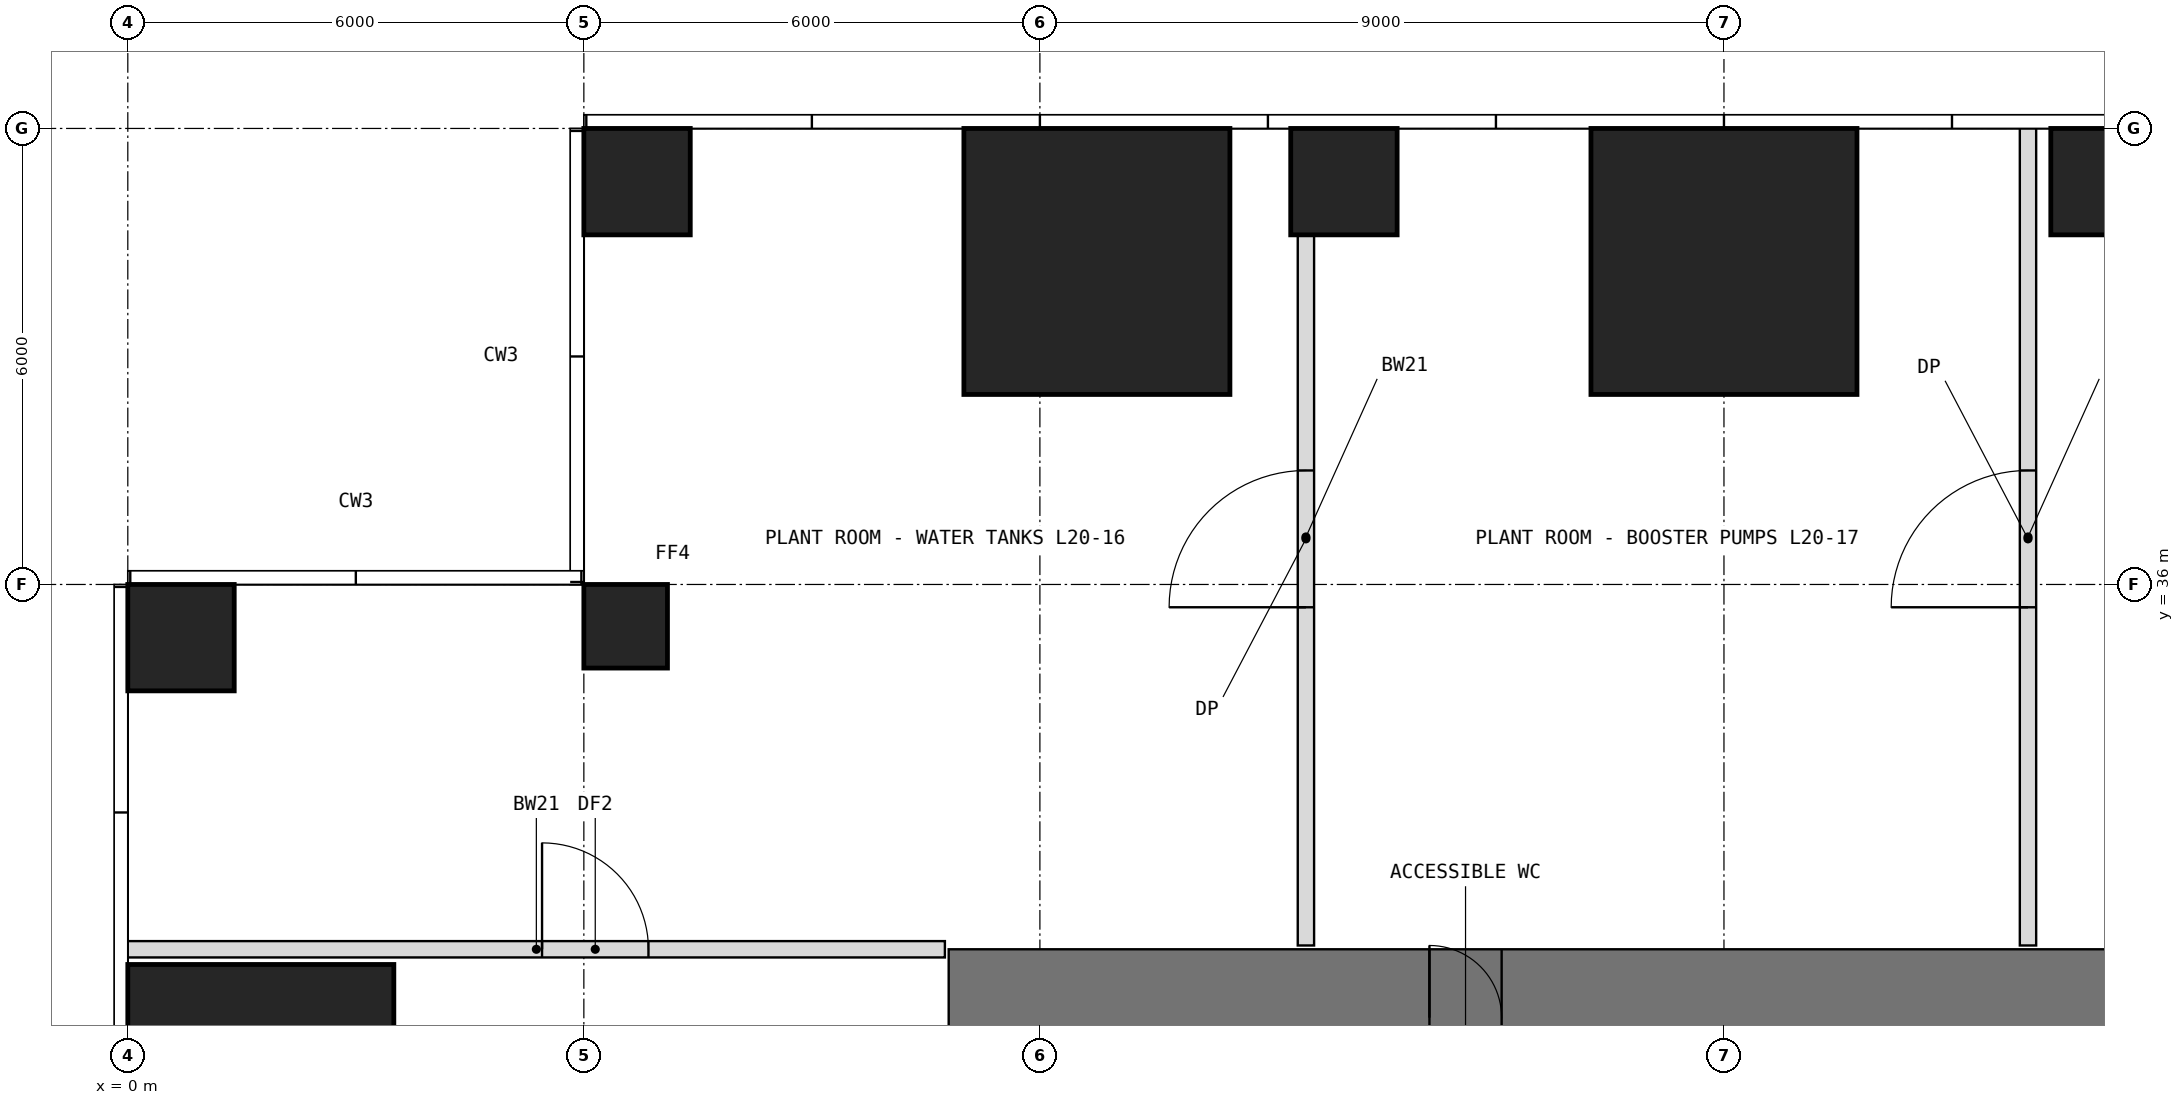
"""IFC4 building model, lengths in metres.
Left out: names, types, materials, properties, quantities, classifications, styles, units other than length and angle.
Written with IfcOpenShell. Run it as: python <this file> out.ifc"""

import sys

from ifc_helpers import new_model, si_unit, direction, frame, frame_2d, origin, origin_2d, place, context, subcontext, project, spatial, rectangle, extrude, element, fill, save


model = new_model("IFC4")
c1 = context("Model", 3, precision=1e-05, world=origin(), true_north=direction((0.0, 1.0)))
c2 = subcontext(c1, "Body", "Model", "MODEL_VIEW")
j1 = project(units=[si_unit("LENGTHUNIT", "METRE"), si_unit("PLANEANGLEUNIT", "RADIAN")], contexts=[c1])
p1 = place(None, origin())
s1 = spatial("IfcSite", under=j1, at=p1, CompositionType="ELEMENT")
p2 = place(p1, origin())
s2 = spatial("IfcBuilding", under=s1, at=p2, CompositionType="ELEMENT")
p3 = place(p2, frame((0.0, 0.0, 86.5)))
s3 = spatial("IfcBuildingStorey", under=s2, at=p3, CompositionType="ELEMENT", Elevation=86.5)
p4 = place(p3, frame((1.75, 29.25, 0.0), z_axis=(0.0, 0.0, 1.0), x_axis=(1.0, 0.0, 0.0)))
e1 = element("IfcColumn", 1, at=p4, inside=s3, PredefinedType="COLUMN", context=c2, shape_type="SweptSolid", body=[
    extrude(rectangle(XDim=3.5, YDim=3.5, at=origin_2d()), origin(), (0.0, 0.0, 1.0), 5.0),
])
p5 = place(p3, frame((0.7, 35.3, 0.0), z_axis=(0.0, 0.0, 1.0), x_axis=(1.0, 0.0, 0.0)))
e2 = element("IfcColumn", 2, at=p5, inside=s3, PredefinedType="COLUMN", context=c2, shape_type="SweptSolid", body=[
    extrude(rectangle(XDim=1.4, YDim=1.4, at=origin_2d()), origin(), (0.0, 0.0, 1.0), 5.0),
])
p6 = place(p3, frame((6.55, 35.45, 0.0), z_axis=(0.0, 0.0, 1.0), x_axis=(1.0, 0.0, 0.0)))
e3 = element("IfcColumn", 3, at=p6, inside=s3, PredefinedType="COLUMN", context=c2, shape_type="SweptSolid", body=[
    extrude(rectangle(XDim=1.1, YDim=1.1, at=origin_2d()), origin(), (0.0, 0.0, 1.0), 5.0),
])
p7 = place(p3, frame((6.7, 41.3, 0.0), z_axis=(0.0, 0.0, 1.0), x_axis=(1.0, 0.0, 0.0)))
e4 = element("IfcColumn", 4, at=p7, inside=s3, PredefinedType="COLUMN", context=c2, shape_type="SweptSolid", body=[
    extrude(rectangle(XDim=1.4, YDim=1.4, at=origin_2d()), origin(), (0.0, 0.0, 1.0), 5.0),
])
p8 = place(p3, frame((12.75, 40.25, 0.0), z_axis=(0.0, 0.0, 1.0), x_axis=(1.0, 0.0, 0.0)))
e5 = element("IfcColumn", 5, at=p8, inside=s3, PredefinedType="COLUMN", context=c2, shape_type="SweptSolid", body=[
    extrude(rectangle(XDim=3.5, YDim=3.5, at=origin_2d()), origin(), (0.0, 0.0, 1.0), 5.0),
])
p9 = place(p3, frame((16.0, 41.3, 0.0), z_axis=(0.0, 0.0, 1.0), x_axis=(1.0, 0.0, 0.0)))
e6 = element("IfcColumn", 6, at=p9, inside=s3, PredefinedType="COLUMN", context=c2, shape_type="SweptSolid", body=[
    extrude(rectangle(XDim=1.4, YDim=1.4, at=origin_2d()), origin(), (0.0, 0.0, 1.0), 5.0),
])
p10 = place(p3, frame((21.0, 40.25, 0.0), z_axis=(0.0, 0.0, 1.0), x_axis=(1.0, 0.0, 0.0)))
e7 = element("IfcColumn", 7, at=p10, inside=s3, PredefinedType="COLUMN", context=c2, shape_type="SweptSolid", body=[
    extrude(rectangle(XDim=3.5, YDim=3.5, at=origin_2d()), origin(), (0.0, 0.0, 1.0), 5.0),
])
p11 = place(p3, frame((26.0, 41.3, 0.0), z_axis=(0.0, 0.0, 1.0), x_axis=(1.0, 0.0, 0.0)))
e8 = element("IfcColumn", 8, at=p11, inside=s3, PredefinedType="COLUMN", context=c2, shape_type="SweptSolid", body=[
    extrude(rectangle(XDim=1.4, YDim=1.4, at=origin_2d()), origin(), (0.0, 0.0, 1.0), 5.0),
])
p12 = place(p3, frame((10.8, 30.3, -0.25), z_axis=(0.0, 0.0, 1.0), x_axis=(1.0, 0.0, 0.0)))
e9 = element("IfcWall", 9, at=p12, inside=s3, PredefinedType="SHEAR", context=c2, shape_type="SweptSolid", body=[
    extrude(rectangle(XDim=20.4, YDim=1.8, at=frame_2d((10.2, 0.0))), origin(), (0.0, 0.0, 1.0), 5.2),
])
p13 = place(p12, frame((6.325, 0.0, 0.25)))
e10 = element("IfcOpeningElement", 10, at=p13, cuts=e9, PredefinedType="OPENING", context=c2, shape_type="SweptSolid", body=[
    extrude(rectangle(XDim=0.95, YDim=2.4, at=frame_2d((0.475, 1.2))), frame((0.0, 0.91, 0.0), z_axis=(0.0, -1.0, 0.0), x_axis=(1.0, 0.0, 0.0)), (0.0, 0.0, 1.0), 1.82),
])
p14 = place(p3, frame((0.0, 31.2, 0.0), z_axis=(0.0, 0.0, 1.0), x_axis=(1.0, 0.0, 0.0)))
e11 = element("IfcWall", 11, at=p14, inside=s3, PredefinedType="PARTITIONING", context=c2, shape_type="SweptSolid", body=[
    extrude(rectangle(XDim=10.75, YDim=0.215, at=frame_2d((5.375, 0.0))), origin(), (0.0, 0.0, 1.0), 4.75),
])
p15 = place(p14, frame((5.45, 0.0, 0.0)))
e12 = element("IfcOpeningElement", 12, at=p15, cuts=e11, PredefinedType="OPENING", context=c2, shape_type="SweptSolid", body=[
    extrude(rectangle(XDim=1.4, YDim=2.2, at=frame_2d((0.7, 1.1))), frame((0.0, 0.118, 0.0), z_axis=(0.0, -1.0, 0.0), x_axis=(1.0, 0.0, 0.0)), (0.0, 0.0, 1.0), 0.235),
])
p16 = place(p3, frame((15.5, 31.25, 0.0), z_axis=(0.0, 0.0, 1.0), x_axis=(0.0, 1.0, 0.0)))
e13 = element("IfcWall", 13, at=p16, inside=s3, PredefinedType="PARTITIONING", context=c2, shape_type="SweptSolid", body=[
    extrude(rectangle(XDim=10.75, YDim=0.215, at=frame_2d((5.375, 0.0))), origin(), (0.0, 0.0, 1.0), 4.75),
])
p17 = place(p16, frame((4.45, 0.0, 0.0)))
e14 = element("IfcOpeningElement", 14, at=p17, cuts=e13, PredefinedType="OPENING", context=c2, shape_type="SweptSolid", body=[
    extrude(rectangle(XDim=1.8, YDim=2.4, at=frame_2d((0.9, 1.2))), frame((0.0, 0.118, 0.0), z_axis=(0.0, -1.0, 0.0), x_axis=(1.0, 0.0, 0.0)), (0.0, 0.0, 1.0), 0.235),
])
p18 = place(p3, frame((25.0, 31.25, 0.0), z_axis=(0.0, 0.0, 1.0), x_axis=(0.0, 1.0, 0.0)))
e15 = element("IfcWall", 15, at=p18, inside=s3, PredefinedType="PARTITIONING", context=c2, shape_type="SweptSolid", body=[
    extrude(rectangle(XDim=10.75, YDim=0.215, at=frame_2d((5.375, 0.0))), origin(), (0.0, 0.0, 1.0), 4.75),
])
p19 = place(p18, frame((4.45, 0.0, 0.0)))
e16 = element("IfcOpeningElement", 16, at=p19, cuts=e15, PredefinedType="OPENING", context=c2, shape_type="SweptSolid", body=[
    extrude(rectangle(XDim=1.8, YDim=2.4, at=frame_2d((0.9, 1.2))), frame((0.0, 0.118, 0.0), z_axis=(0.0, -1.0, 0.0), x_axis=(1.0, 0.0, 0.0)), (0.0, 0.0, 1.0), 0.235),
])
p20 = place(p13, origin())
e17 = element("IfcDoor", 17, at=p20, inside=s3, OperationType="SINGLE_SWING_LEFT", PredefinedType="DOOR", context=c2, shape_type="SweptSolid", body=[
    extrude(rectangle(XDim=0.95, YDim=2.4, at=frame_2d((0.475, 1.2))), frame((0.0, 0.025, 0.0), z_axis=(0.0, -1.0, 0.0), x_axis=(1.0, 0.0, 0.0)), (0.0, 0.0, 1.0), 0.05),
])
fill(e10, e17)
p21 = place(p17, origin())
e18 = element("IfcDoor", 18, at=p21, inside=s3, OperationType="DOUBLE_DOOR_SINGLE_SWING", PredefinedType="DOOR", context=c2, shape_type="SweptSolid", body=[
    extrude(rectangle(XDim=1.8, YDim=2.4, at=frame_2d((0.9, 1.2))), frame((0.0, 0.025, 0.0), z_axis=(0.0, -1.0, 0.0), x_axis=(1.0, 0.0, 0.0)), (0.0, 0.0, 1.0), 0.05),
])
fill(e14, e18)
p22 = place(p19, origin())
e19 = element("IfcDoor", 19, at=p22, inside=s3, OperationType="DOUBLE_DOOR_SINGLE_SWING", PredefinedType="DOOR", context=c2, shape_type="SweptSolid", body=[
    extrude(rectangle(XDim=1.8, YDim=2.4, at=frame_2d((0.9, 1.2))), frame((0.0, 0.025, 0.0), z_axis=(0.0, -1.0, 0.0), x_axis=(1.0, 0.0, 0.0)), (0.0, 0.0, 1.0), 0.05),
])
fill(e16, e19)
p23 = place(p15, origin())
e20 = element("IfcDoor", 20, at=p23, inside=s3, OperationType="SINGLE_SWING_LEFT", PredefinedType="DOOR", context=c2, shape_type="SweptSolid", body=[
    extrude(rectangle(XDim=1.4, YDim=2.2, at=frame_2d((0.7, 1.1))), frame((0.0, 0.025, 0.0), z_axis=(0.0, -1.0, 0.0), x_axis=(1.0, 0.0, 0.0)), (0.0, 0.0, 1.0), 0.05),
])
fill(e12, e20)
save(model, sys.argv[1])
